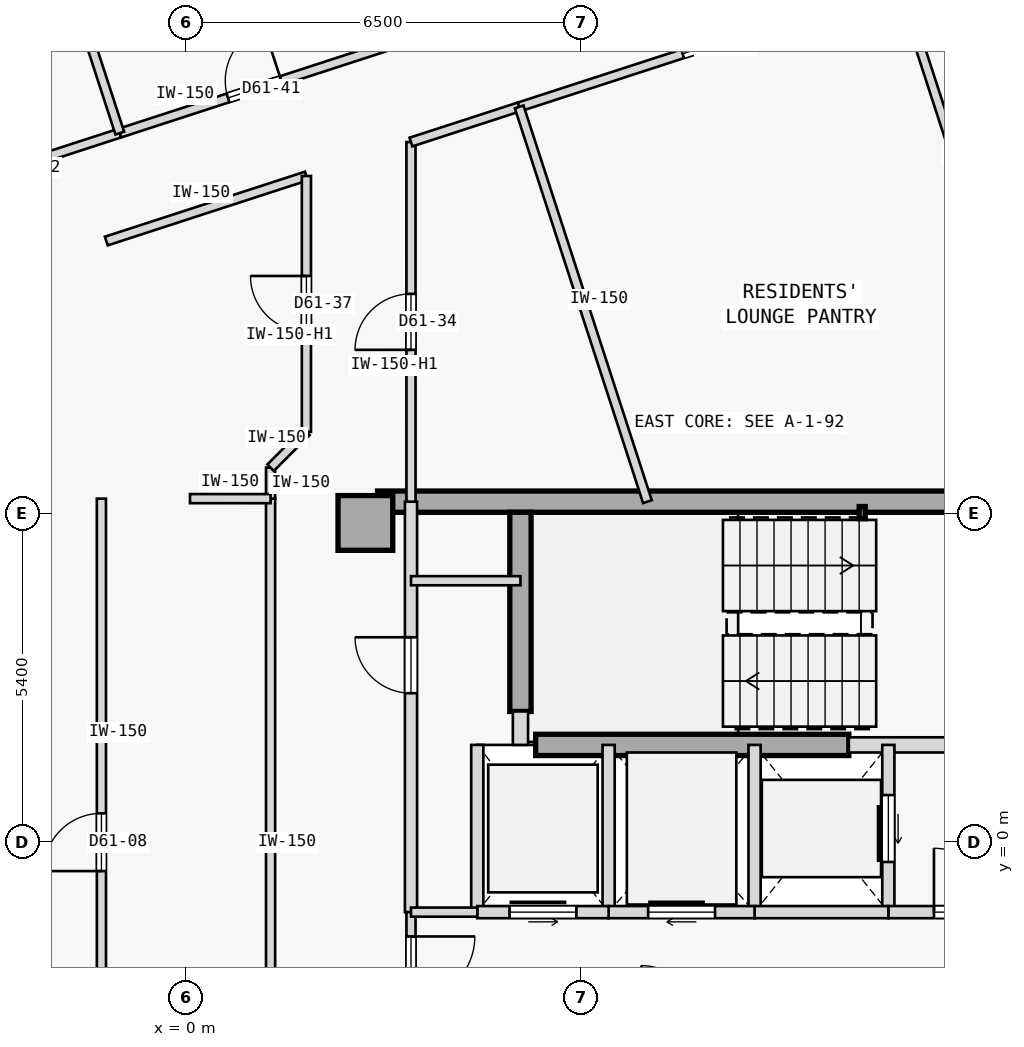
"""IFC4 building model, lengths in metres.
Left out: names, types, materials, properties, quantities, classifications, styles, units other than length and angle.
Written with IfcOpenShell. Run it as: python <this file> out.ifc"""

import sys

from ifc_helpers import new_model, si_unit, direction, frame, frame_2d, origin, origin_2d, place, context, subcontext, project, spatial, rectangle, hollow_rectangle, extrude, element, fill, save


model = new_model("IFC4")
c1 = context("Model", 3, precision=1e-05, world=origin(), true_north=direction((0.0, 1.0)))
c2 = subcontext(c1, "Body", "Model", "MODEL_VIEW")
j1 = project(units=[si_unit("LENGTHUNIT", "METRE"), si_unit("PLANEANGLEUNIT", "RADIAN")], contexts=[c1])
p1 = place(None, origin())
s1 = spatial("IfcSite", under=j1, at=p1, CompositionType="ELEMENT")
p2 = place(p1, origin())
s2 = spatial("IfcBuilding", under=s1, at=p2, CompositionType="ELEMENT")
p3 = place(p2, frame((0.0, 0.0, 231.0)))
s3 = spatial("IfcBuildingStorey", under=s2, at=p3, CompositionType="ELEMENT", Elevation=231.0)
p4 = place(p3, frame((2.95, 5.25, 0.0), z_axis=(0.0, 0.0, 1.0), x_axis=(1.0, 0.0, 0.0)))
e1 = element("IfcColumn", 1, at=p4, inside=s3, PredefinedType="COLUMN", context=c2, shape_type="SweptSolid", body=[
    extrude(rectangle(XDim=0.9, YDim=0.9, at=origin_2d()), origin(), (0.0, 0.0, 1.0), 3.35),
])
p5 = place(p3, frame((3.15, 5.6, 0.0), z_axis=(0.0, 0.0, 1.0), x_axis=(1.0, 0.0, 0.0)))
e2 = element("IfcWall", 2, at=p5, inside=s3, PredefinedType="SHEAR", context=c2, shape_type="SweptSolid", body=[
    extrude(rectangle(XDim=11.41, YDim=0.35, at=frame_2d((5.705, 0.0))), origin(), (0.0, 0.0, 1.0), 3.125),
])
p6 = place(p3, frame((5.5, 2.15, 0.0), z_axis=(0.0, 0.0, 1.0), x_axis=(0.0, 1.0, 0.0)))
e3 = element("IfcWall", 3, at=p6, inside=s3, PredefinedType="SHEAR", context=c2, shape_type="SweptSolid", body=[
    extrude(rectangle(XDim=3.275, YDim=0.35, at=frame_2d((1.638, 0.0))), origin(), (0.0, 0.0, 1.0), 3.125),
])
p7 = place(p3, frame((5.75, 1.6, 0.0), z_axis=(0.0, 0.0, 1.0), x_axis=(1.0, 0.0, 0.0)))
e4 = element("IfcWall", 4, at=p7, inside=s3, PredefinedType="SHEAR", context=c2, shape_type="SweptSolid", body=[
    extrude(rectangle(XDim=5.15, YDim=0.35, at=frame_2d((2.575, 0.0))), origin(), (0.0, 0.0, 1.0), 3.125),
])
p8 = place(p3, frame((11.12, 5.42, 0.0), z_axis=(0.0, 0.0, 1.0), x_axis=(1.0, 0.0, 0.0)))
e5 = element("IfcColumn", 5, at=p8, inside=s3, PredefinedType="COLUMN", context=c2, shape_type="SweptSolid", body=[
    extrude(hollow_rectangle(XDim=0.1, YDim=0.2, WallThickness=0.008, at=origin_2d()), origin(), (0.0, 0.0, 1.0), 3.35),
])
p9 = place(p3, frame((10.9, 1.6, 0.0), z_axis=(0.0, 0.0, 1.0), x_axis=(1.0, 0.0, 0.0)))
e6 = element("IfcWall", 6, at=p9, inside=s3, PredefinedType="STANDARD", context=c2, shape_type="SweptSolid", body=[
    extrude(rectangle(XDim=3.6, YDim=0.25, at=frame_2d((1.8, 0.0))), origin(), (0.0, 0.0, 1.0), 3.125),
])
p10 = place(p9, frame((1.62, 0.0, 0.0)))
e7 = element("IfcOpeningElement", 7, at=p10, cuts=e6, PredefinedType="OPENING", context=c2, shape_type="SweptSolid", body=[
    extrude(rectangle(XDim=1.05, YDim=2.15, at=frame_2d((0.525, 1.075))), frame((0.0, 0.135, 0.0), z_axis=(0.0, -1.0, 0.0), x_axis=(1.0, 0.0, 0.0)), (0.0, 0.0, 1.0), 0.27),
])
p11 = place(p3, frame((5.5, 1.6, 0.0), z_axis=(0.0, 0.0, 1.0), x_axis=(0.0, 1.0, 0.0)))
e8 = element("IfcWall", 8, at=p11, inside=s3, PredefinedType="STANDARD", context=c2, shape_type="SweptSolid", body=[
    extrude(rectangle(XDim=0.55, YDim=0.25, at=frame_2d((0.275, 0.0))), origin(), (0.0, 0.0, 1.0), 3.125),
])
p12 = place(p3, frame((3.7, -1.15, 0.0), z_axis=(0.0, 0.0, 1.0), x_axis=(0.0, 1.0, 0.0)))
e9 = element("IfcWall", 9, at=p12, inside=s3, PredefinedType="STANDARD", context=c2, shape_type="SweptSolid", body=[
    extrude(rectangle(XDim=6.75, YDim=0.2, at=frame_2d((3.375, 0.0))), origin(), (0.0, 0.0, 1.0), 3.125),
])
p13 = place(p12, frame((3.6, 0.0, 0.0)))
e10 = element("IfcOpeningElement", 10, at=p13, cuts=e9, PredefinedType="OPENING", context=c2, shape_type="SweptSolid", body=[
    extrude(rectangle(XDim=0.92, YDim=2.15, at=frame_2d((0.46, 1.075))), frame((0.0, 0.11, 0.0), z_axis=(0.0, -1.0, 0.0), x_axis=(1.0, 0.0, 0.0)), (0.0, 0.0, 1.0), 0.22),
])
p14 = place(p3, frame((3.7, -2.95, 0.0), z_axis=(0.0, 0.0, 1.0), x_axis=(0.0, 1.0, 0.0)))
e11 = element("IfcWall", 11, at=p14, inside=s3, PredefinedType="PARTITIONING", context=c2, shape_type="SweptSolid", body=[
    extrude(rectangle(XDim=1.8, YDim=0.15, at=frame_2d((0.9, 0.0))), origin(), (0.0, 0.0, 1.0), 3.125),
])
p15 = place(p14, frame((0.35, 0.0, 0.0)))
e12 = element("IfcOpeningElement", 12, at=p15, cuts=e11, PredefinedType="OPENING", context=c2, shape_type="SweptSolid", body=[
    extrude(rectangle(XDim=1.05, YDim=2.18, at=frame_2d((0.525, 1.09))), frame((0.0, 0.085, 0.0), z_axis=(0.0, -1.0, 0.0), x_axis=(1.0, 0.0, 0.0)), (0.0, 0.0, 1.0), 0.17),
])
p16 = place(p3, frame((11.55, -1.15, 0.0), z_axis=(0.0, 0.0, 1.0), x_axis=(0.0, 1.0, 0.0)))
e13 = element("IfcWall", 13, at=p16, inside=s3, PredefinedType="STANDARD", context=c2, shape_type="SweptSolid", body=[
    extrude(rectangle(XDim=2.75, YDim=0.2, at=frame_2d((1.375, 0.0))), origin(), (0.0, 0.0, 1.0), 3.125),
])
p17 = place(p16, frame((0.825, 0.0, 0.0)))
e14 = element("IfcOpeningElement", 14, at=p17, cuts=e13, PredefinedType="OPENING", context=c2, shape_type="SweptSolid", body=[
    extrude(rectangle(XDim=1.1, YDim=2.15, at=frame_2d((0.55, 1.075))), frame((0.0, 0.11, 0.0), z_axis=(0.0, -1.0, 0.0), x_axis=(1.0, 0.0, 0.0)), (0.0, 0.0, 1.0), 0.22),
])
p18 = place(p3, frame((9.35, -1.15, 0.0), z_axis=(0.0, 0.0, 1.0), x_axis=(0.0, 1.0, 0.0)))
e15 = element("IfcWall", 15, at=p18, inside=s3, PredefinedType="STANDARD", context=c2, shape_type="SweptSolid", body=[
    extrude(rectangle(XDim=2.75, YDim=0.2, at=frame_2d((1.375, 0.0))), origin(), (0.0, 0.0, 1.0), 3.125),
])
p19 = place(p3, frame((11.55, -1.15, 0.0), z_axis=(0.0, 0.0, 1.0), x_axis=(1.0, 0.0, 0.0)))
e16 = element("IfcWall", 16, at=p19, inside=s3, PredefinedType="STANDARD", context=c2, shape_type="SweptSolid", body=[
    extrude(rectangle(XDim=2.95, YDim=0.2, at=frame_2d((1.475, 0.0))), origin(), (0.0, 0.0, 1.0), 3.125),
])
p20 = place(p19, frame((0.75, 0.0, 0.0)))
e17 = element("IfcOpeningElement", 17, at=p20, cuts=e16, PredefinedType="OPENING", context=c2, shape_type="SweptSolid", body=[
    extrude(rectangle(XDim=1.05, YDim=2.18, at=frame_2d((0.525, 1.09))), frame((0.0, 0.11, 0.0), z_axis=(0.0, -1.0, 0.0), x_axis=(1.0, 0.0, 0.0)), (0.0, 0.0, 1.0), 0.22),
])
p21 = place(p3, frame((9.35, -1.15, 0.0), z_axis=(0.0, 0.0, 1.0), x_axis=(1.0, 0.0, 0.0)))
e18 = element("IfcWall", 18, at=p21, inside=s3, PredefinedType="STANDARD", context=c2, shape_type="SweptSolid", body=[
    extrude(rectangle(XDim=2.2, YDim=0.2, at=frame_2d((1.1, 0.0))), origin(), (0.0, 0.0, 1.0), 3.125),
])
p22 = place(p3, frame((6.95, -1.15, 0.0), z_axis=(0.0, 0.0, 1.0), x_axis=(0.0, 1.0, 0.0)))
e19 = element("IfcWall", 19, at=p22, inside=s3, PredefinedType="STANDARD", context=c2, shape_type="SweptSolid", body=[
    extrude(rectangle(XDim=2.75, YDim=0.2, at=frame_2d((1.375, 0.0))), origin(), (0.0, 0.0, 1.0), 3.125),
])
p23 = place(p3, frame((6.95, -1.15, 0.0), z_axis=(0.0, 0.0, 1.0), x_axis=(1.0, 0.0, 0.0)))
e20 = element("IfcWall", 20, at=p23, inside=s3, PredefinedType="STANDARD", context=c2, shape_type="SweptSolid", body=[
    extrude(rectangle(XDim=2.4, YDim=0.2, at=frame_2d((1.2, 0.0))), origin(), (0.0, 0.0, 1.0), 3.125),
])
p24 = place(p23, frame((0.65, 0.0, 0.0)))
e21 = element("IfcOpeningElement", 21, at=p24, cuts=e20, PredefinedType="OPENING", context=c2, shape_type="SweptSolid", body=[
    extrude(rectangle(XDim=1.1, YDim=2.15, at=frame_2d((0.55, 1.075))), frame((0.0, 0.11, 0.0), z_axis=(0.0, -1.0, 0.0), x_axis=(1.0, 0.0, 0.0)), (0.0, 0.0, 1.0), 0.22),
])
p25 = place(p3, frame((4.79, -1.15, 0.0), z_axis=(0.0, 0.0, 1.0), x_axis=(0.0, 1.0, 0.0)))
e22 = element("IfcWall", 22, at=p25, inside=s3, PredefinedType="STANDARD", context=c2, shape_type="SweptSolid", body=[
    extrude(rectangle(XDim=2.75, YDim=0.2, at=frame_2d((1.375, 0.0))), origin(), (0.0, 0.0, 1.0), 3.125),
])
p26 = place(p3, frame((4.79, -1.15, 0.0), z_axis=(0.0, 0.0, 1.0), x_axis=(1.0, 0.0, 0.0)))
e23 = element("IfcWall", 23, at=p26, inside=s3, PredefinedType="STANDARD", context=c2, shape_type="SweptSolid", body=[
    extrude(rectangle(XDim=2.16, YDim=0.2, at=frame_2d((1.08, 0.0))), origin(), (0.0, 0.0, 1.0), 3.125),
])
p27 = place(p26, frame((0.53, 0.0, 0.0)))
e24 = element("IfcOpeningElement", 24, at=p27, cuts=e23, PredefinedType="OPENING", context=c2, shape_type="SweptSolid", body=[
    extrude(rectangle(XDim=1.1, YDim=2.15, at=frame_2d((0.55, 1.075))), frame((0.0, 0.11, 0.0), z_axis=(0.0, -1.0, 0.0), x_axis=(1.0, 0.0, 0.0)), (0.0, 0.0, 1.0), 0.22),
])
p28 = place(p3, frame((3.7, -1.15, 0.0), z_axis=(0.0, 0.0, 1.0), x_axis=(1.0, 0.0, 0.0)))
e25 = element("IfcWall", 25, at=p28, inside=s3, PredefinedType="PARTITIONING", context=c2, shape_type="SweptSolid", body=[
    extrude(rectangle(XDim=1.09, YDim=0.15, at=frame_2d((0.545, 0.0))), origin(), (0.0, 0.0, 1.0), 3.125),
])
p29 = place(p3, frame((3.7, 4.3, 0.0), z_axis=(0.0, 0.0, 1.0), x_axis=(1.0, 0.0, 0.0)))
e26 = element("IfcWall", 26, at=p29, inside=s3, PredefinedType="PARTITIONING", context=c2, shape_type="SweptSolid", body=[
    extrude(rectangle(XDim=1.8, YDim=0.15, at=frame_2d((0.9, 0.0))), origin(), (0.0, 0.0, 1.0), 3.125),
])
p30 = place(p3, frame((-1.391, -5.65, 0.0), z_axis=(0.0, 0.0, 1.0), x_axis=(-8.6422954e-05, 0.999999996266, 0.0)))
e27 = element("IfcWall", 27, at=p30, inside=s3, PredefinedType="PARTITIONING", context=c2, shape_type="SweptSolid", body=[
    extrude(rectangle(XDim=11.3, YDim=0.15, at=frame_2d((5.65, 0.0))), origin(), (0.0, 0.0, 1.0), 3.125),
])
p31 = place(p30, frame((5.175, 0.0, 0.0)))
e28 = element("IfcOpeningElement", 28, at=p31, cuts=e27, PredefinedType="OPENING", context=c2, shape_type="SweptSolid", body=[
    extrude(rectangle(XDim=0.95, YDim=2.15, at=frame_2d((0.475, 1.075))), frame((0.0, 0.085, 0.0), z_axis=(0.0, -1.0, 0.0), x_axis=(1.0, 0.0, 0.0)), (0.0, 0.0, 1.0), 0.17),
])
p32 = place(p3, frame((1.391, -5.648, 0.0), z_axis=(0.0, 0.0, 1.0), x_axis=(-4.3218947e-05, 0.999999999066, 0.0)))
e29 = element("IfcWall", 29, at=p32, inside=s3, PredefinedType="PARTITIONING", context=c2, shape_type="SweptSolid", body=[
    extrude(rectangle(XDim=11.298, YDim=0.15, at=frame_2d((5.649, 0.0))), origin(), (0.0, 0.0, 1.0), 3.125),
])
p33 = place(p3, frame((-4.561, 10.533, 0.0), z_axis=(0.0, 0.0, 1.0), x_axis=(0.951057168147, 0.309014988174, 0.0)))
e30 = element("IfcWall", 30, at=p33, inside=s3, PredefinedType="PARTITIONING", context=c2, shape_type="SweptSolid", body=[
    extrude(rectangle(XDim=3.65, YDim=0.15, at=frame_2d((1.825, 0.0))), origin(), (0.0, 0.0, 1.0), 3.125),
])
p34 = place(p33, frame((1.35, 0.0, 0.0)))
e31 = element("IfcOpeningElement", 31, at=p34, cuts=e30, PredefinedType="OPENING", context=c2, shape_type="SweptSolid", body=[
    extrude(rectangle(XDim=0.95, YDim=2.15, at=frame_2d((0.475, 1.075))), frame((0.0, 0.085, 0.0), z_axis=(0.0, -1.0, 0.0), x_axis=(1.0, 0.0, 0.0)), (0.0, 0.0, 1.0), 0.17),
])
p35 = place(p3, frame((3.7, 5.6, 0.0), z_axis=(0.0, 0.0, 1.0), x_axis=(-0.000123839008, 0.999999992332, 0.0)))
e32 = element("IfcWall", 32, at=p35, inside=s3, PredefinedType="PARTITIONING", context=c2, shape_type="SweptSolid", body=[
    extrude(rectangle(XDim=5.914, YDim=0.15, at=frame_2d((2.957, 0.0))), origin(), (0.0, 0.0, 1.0), 2.675),
])
p36 = place(p35, frame((2.497, 0.0, 0.0)))
e33 = element("IfcOpeningElement", 33, at=p36, cuts=e32, PredefinedType="OPENING", context=c2, shape_type="SweptSolid", body=[
    extrude(rectangle(XDim=0.92, YDim=2.15, at=frame_2d((0.46, 1.075))), frame((0.0, 0.085, 0.0), z_axis=(0.0, -1.0, 0.0), x_axis=(1.0, 0.0, 0.0)), (0.0, 0.0, 1.0), 0.17),
])
p37 = place(p3, frame((3.699, 11.514, 0.0), z_axis=(0.0, 0.0, 1.0), x_axis=(0.951069540665, 0.308976906612, 0.0)))
e34 = element("IfcWall", 34, at=p37, inside=s3, PredefinedType="PARTITIONING", context=c2, shape_type="SweptSolid", body=[
    extrude(rectangle(XDim=1.871, YDim=0.15, at=frame_2d((0.936, 0.0))), origin(), (0.0, 0.0, 1.0), 3.125),
])
p38 = place(p3, frame((5.479, 12.092, 0.0), z_axis=(0.0, 0.0, 1.0), x_axis=(0.951051809397, 0.309031480343, 0.0)))
e35 = element("IfcWall", 35, at=p38, inside=s3, PredefinedType="PARTITIONING", context=c2, shape_type="SweptSolid", body=[
    extrude(rectangle(XDim=6.573, YDim=0.15, at=frame_2d((3.287, 0.0))), origin(), (0.0, 0.0, 1.0), 3.125),
])
p39 = place(p38, frame((2.826, 0.0, 0.0)))
e36 = element("IfcOpeningElement", 36, at=p39, cuts=e35, PredefinedType="OPENING", context=c2, shape_type="SweptSolid", body=[
    extrude(rectangle(XDim=0.92, YDim=2.15, at=frame_2d((0.46, 1.075))), frame((0.0, 0.085, 0.0), z_axis=(0.0, -1.0, 0.0), x_axis=(1.0, 0.0, 0.0)), (0.0, 0.0, 1.0), 0.17),
])
p40 = place(p3, frame((-1.311, 9.886, 0.0), z_axis=(0.0, 0.0, 1.0), x_axis=(0.951068803905, 0.308979174442, 0.0)))
e37 = element("IfcWall", 37, at=p40, inside=s3, PredefinedType="PARTITIONING", context=c2, shape_type="SweptSolid", body=[
    extrude(rectangle(XDim=3.46, YDim=0.15, at=frame_2d((1.73, 0.0))), origin(), (0.0, 0.0, 1.0), 3.125),
])
p41 = place(p3, frame((1.391, 5.649, 0.0), z_axis=(0.0, 0.0, 1.0), x_axis=(0.000957395444, 0.999999541697, 0.0)))
e38 = element("IfcWall", 38, at=p41, inside=s3, PredefinedType="PARTITIONING", context=c2, shape_type="SweptSolid", body=[
    extrude(rectangle(XDim=0.51, YDim=0.15, at=frame_2d((0.255, 0.0))), origin(), (0.0, 0.0, 1.0), 3.125),
])
p42 = place(p3, frame((1.391, 6.159, 0.0), z_axis=(0.0, 0.0, 1.0), x_axis=(0.707106781187, 0.707106781187, 0.0)))
e39 = element("IfcWall", 39, at=p42, inside=s3, PredefinedType="PARTITIONING", context=c2, shape_type="SweptSolid", body=[
    extrude(rectangle(XDim=0.833, YDim=0.15, at=frame_2d((0.417, 0.0))), origin(), (0.0, 0.0, 1.0), 3.125),
])
p43 = place(p3, frame((1.98, 6.748, 0.0), z_axis=(0.0, 0.0, 1.0), x_axis=(0.0, 1.0, 0.0)))
e40 = element("IfcWall", 40, at=p43, inside=s3, PredefinedType="PARTITIONING", context=c2, shape_type="SweptSolid", body=[
    extrude(rectangle(XDim=4.207, YDim=0.15, at=frame_2d((2.104, 0.0))), origin(), (0.0, 0.0, 1.0), 2.675),
])
p44 = place(p43, frame((1.643, 0.0, 0.0)))
e41 = element("IfcOpeningElement", 41, at=p44, cuts=e40, PredefinedType="OPENING", context=c2, shape_type="SweptSolid", body=[
    extrude(rectangle(XDim=0.92, YDim=2.15, at=frame_2d((0.46, 1.075))), frame((0.0, 0.085, 0.0), z_axis=(0.0, -1.0, 0.0), x_axis=(1.0, 0.0, 0.0)), (0.0, 0.0, 1.0), 0.17),
])
p45 = place(p3, frame((-1.089, 11.661, 0.0), z_axis=(0.0, 0.0, 1.0), x_axis=(0.951043687064, 0.309056475901, 0.0)))
e42 = element("IfcWall", 42, at=p45, inside=s3, PredefinedType="PARTITIONING", context=c2, shape_type="SweptSolid", body=[
    extrude(rectangle(XDim=4.663, YDim=0.15, at=frame_2d((2.332, 0.0))), origin(), (0.0, 0.0, 1.0), 3.125),
])
p46 = place(p45, frame((1.872, 0.0, 0.0)))
e43 = element("IfcOpeningElement", 43, at=p46, cuts=e42, PredefinedType="OPENING", context=c2, shape_type="SweptSolid", body=[
    extrude(rectangle(XDim=0.92, YDim=2.15, at=frame_2d((0.46, 1.075))), frame((0.0, 0.085, 0.0), z_axis=(0.0, -1.0, 0.0), x_axis=(1.0, 0.0, 0.0)), (0.0, 0.0, 1.0), 0.17),
])
p47 = place(p3, frame((0.066, 5.65, 0.0), z_axis=(0.0, 0.0, 1.0), x_axis=(0.999999932094, -0.000368527707, 0.0)))
e44 = element("IfcWall", 44, at=p47, inside=s3, PredefinedType="PARTITIONING", context=c2, shape_type="SweptSolid", body=[
    extrude(rectangle(XDim=1.325, YDim=0.15, at=frame_2d((0.663, 0.0))), origin(), (0.0, 0.0, 1.0), 3.125),
])
p48 = place(p3, frame((-1.089, 11.661, 0.0), z_axis=(0.0, 0.0, 1.0), x_axis=(-0.309029230739, 0.951052540372, 0.0)))
e45 = element("IfcWall", 45, at=p48, inside=s3, PredefinedType="PARTITIONING", context=c2, shape_type="SweptSolid", body=[
    extrude(rectangle(XDim=7.284, YDim=0.15, at=frame_2d((3.642, 0.0))), origin(), (0.0, 0.0, 1.0), 3.125),
])
p49 = place(p3, frame((7.588, 5.6, 0.0), z_axis=(0.0, 0.0, 1.0), x_axis=(-0.309018946982, 0.951055881852, 0.0)))
e46 = element("IfcWall", 46, at=p49, inside=s3, PredefinedType="PARTITIONING", context=c2, shape_type="SweptSolid", body=[
    extrude(rectangle(XDim=6.826, YDim=0.15, at=frame_2d((3.413, 0.0))), origin(), (0.0, 0.0, 1.0), 3.125),
])
p50 = place(p3, frame((13.003, 10.206, 0.0), z_axis=(0.0, 0.0, 1.0), x_axis=(-0.309035144366, 0.951050618814, 0.0)))
e47 = element("IfcWall", 47, at=p50, inside=s3, PredefinedType="PARTITIONING", context=c2, shape_type="SweptSolid", body=[
    extrude(rectangle(XDim=4.119, YDim=0.15, at=frame_2d((2.06, 0.0))), origin(), (0.0, 0.0, 1.0), 3.125),
])
p51 = place(p20, origin())
e48 = element("IfcDoor", 48, at=p51, inside=s3, OperationType="SINGLE_SWING_LEFT", PredefinedType="DOOR", context=c2, shape_type="SweptSolid", body=[
    extrude(rectangle(XDim=1.05, YDim=2.18, at=frame_2d((0.525, 1.09))), frame((0.0, 0.025, 0.0), z_axis=(0.0, -1.0, 0.0), x_axis=(1.0, 0.0, 0.0)), (0.0, 0.0, 1.0), 0.05),
])
fill(e17, e48)
p52 = place(p15, frame((1.05, 0.0, 0.0), z_axis=(0.0, 0.0, 1.0), x_axis=(-1.0, 0.0, 0.0)))
e49 = element("IfcDoor", 49, at=p52, inside=s3, OperationType="SINGLE_SWING_RIGHT", PredefinedType="DOOR", context=c2, shape_type="SweptSolid", body=[
    extrude(rectangle(XDim=1.05, YDim=2.18, at=frame_2d((0.525, 1.09))), frame((0.0, 0.025, 0.0), z_axis=(0.0, -1.0, 0.0), x_axis=(1.0, 0.0, 0.0)), (0.0, 0.0, 1.0), 0.05),
])
fill(e12, e49)
p53 = place(p17, origin())
e50 = element("IfcDoor", 50, at=p53, inside=s3, OperationType="SLIDING_TO_RIGHT", PredefinedType="DOOR", context=c2, shape_type="SweptSolid", body=[
    extrude(rectangle(XDim=1.1, YDim=2.15, at=frame_2d((0.55, 1.075))), frame((0.0, 0.025, 0.0), z_axis=(0.0, -1.0, 0.0), x_axis=(1.0, 0.0, 0.0)), (0.0, 0.0, 1.0), 0.05),
])
fill(e14, e50)
p54 = place(p24, origin())
e51 = element("IfcDoor", 51, at=p54, inside=s3, OperationType="SLIDING_TO_RIGHT", PredefinedType="DOOR", context=c2, shape_type="SweptSolid", body=[
    extrude(rectangle(XDim=1.1, YDim=2.15, at=frame_2d((0.55, 1.075))), frame((0.0, 0.025, 0.0), z_axis=(0.0, -1.0, 0.0), x_axis=(1.0, 0.0, 0.0)), (0.0, 0.0, 1.0), 0.05),
])
fill(e21, e51)
p55 = place(p27, origin())
e52 = element("IfcDoor", 52, at=p55, inside=s3, OperationType="SLIDING_TO_LEFT", PredefinedType="DOOR", context=c2, shape_type="SweptSolid", body=[
    extrude(rectangle(XDim=1.1, YDim=2.15, at=frame_2d((0.55, 1.075))), frame((0.0, 0.025, 0.0), z_axis=(0.0, -1.0, 0.0), x_axis=(1.0, 0.0, 0.0)), (0.0, 0.0, 1.0), 0.05),
])
fill(e24, e52)
p56 = place(p13, origin())
e53 = element("IfcDoor", 53, at=p56, inside=s3, OperationType="SINGLE_SWING_RIGHT", PredefinedType="DOOR", context=c2, shape_type="SweptSolid", body=[
    extrude(rectangle(XDim=0.92, YDim=2.15, at=frame_2d((0.46, 1.075))), frame((0.0, 0.025, 0.0), z_axis=(0.0, -1.0, 0.0), x_axis=(1.0, 0.0, 0.0)), (0.0, 0.0, 1.0), 0.05),
])
fill(e10, e53)
p57 = place(p31, origin())
e54 = element("IfcDoor", 54, at=p57, inside=s3, OperationType="SINGLE_SWING_LEFT", PredefinedType="DOOR", context=c2, shape_type="SweptSolid", body=[
    extrude(rectangle(XDim=0.95, YDim=2.15, at=frame_2d((0.475, 1.075))), frame((0.0, 0.025, 0.0), z_axis=(0.0, -1.0, 0.0), x_axis=(1.0, 0.0, 0.0)), (0.0, 0.0, 1.0), 0.05),
])
fill(e28, e54)
p58 = place(p36, origin())
e55 = element("IfcDoor", 55, at=p58, inside=s3, OperationType="SINGLE_SWING_LEFT", PredefinedType="DOOR", context=c2, shape_type="SweptSolid", body=[
    extrude(rectangle(XDim=0.92, YDim=2.15, at=frame_2d((0.46, 1.075))), frame((0.0, 0.025, 0.0), z_axis=(0.0, -1.0, 0.0), x_axis=(1.0, 0.0, 0.0)), (0.0, 0.0, 1.0), 0.05),
])
fill(e33, e55)
p59 = place(p39, origin())
e56 = element("IfcDoor", 56, at=p59, inside=s3, OperationType="SINGLE_SWING_RIGHT", PredefinedType="DOOR", context=c2, shape_type="SweptSolid", body=[
    extrude(rectangle(XDim=0.92, YDim=2.15, at=frame_2d((0.46, 1.075))), frame((0.0, 0.025, 0.0), z_axis=(0.0, -1.0, 0.0), x_axis=(1.0, 0.0, 0.0)), (0.0, 0.0, 1.0), 0.05),
])
fill(e36, e56)
p60 = place(p44, origin())
e57 = element("IfcDoor", 57, at=p60, inside=s3, OperationType="SINGLE_SWING_RIGHT", PredefinedType="DOOR", context=c2, shape_type="SweptSolid", body=[
    extrude(rectangle(XDim=0.92, YDim=2.15, at=frame_2d((0.46, 1.075))), frame((0.0, 0.025, 0.0), z_axis=(0.0, -1.0, 0.0), x_axis=(1.0, 0.0, 0.0)), (0.0, 0.0, 1.0), 0.05),
])
fill(e41, e57)
p61 = place(p46, origin())
e58 = element("IfcDoor", 58, at=p61, inside=s3, OperationType="SINGLE_SWING_RIGHT", PredefinedType="DOOR", context=c2, shape_type="SweptSolid", body=[
    extrude(rectangle(XDim=0.92, YDim=2.15, at=frame_2d((0.46, 1.075))), frame((0.0, 0.025, 0.0), z_axis=(0.0, -1.0, 0.0), x_axis=(1.0, 0.0, 0.0)), (0.0, 0.0, 1.0), 0.05),
])
fill(e43, e58)
save(model, sys.argv[1])
